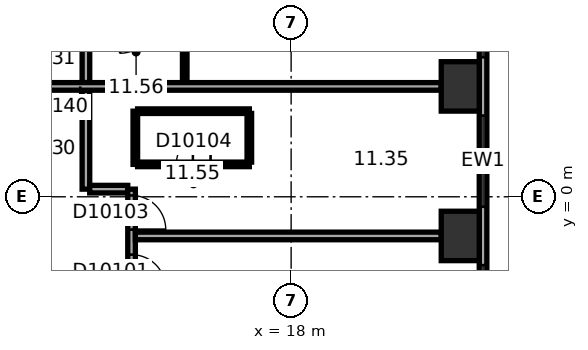
"""IFC4 building model, lengths in metres.
Left out: names, types, materials, properties, quantities, classifications, styles, units other than length and angle.
Written with IfcOpenShell. Run it as: python <this file> out.ifc"""

import sys

from ifc_helpers import new_model, si_unit, direction, frame, frame_2d, origin, origin_2d, place, context, subcontext, project, spatial, rectangle, extrude, element, fill, save


model = new_model("IFC4")
c1 = context("Model", 3, precision=1e-05, world=origin(), true_north=direction((0.0, 1.0)))
c2 = subcontext(c1, "Body", "Model", "MODEL_VIEW")
j1 = project(units=[si_unit("LENGTHUNIT", "METRE"), si_unit("PLANEANGLEUNIT", "RADIAN")], contexts=[c1])
p1 = place(None, origin())
s1 = spatial("IfcSite", under=j1, at=p1, CompositionType="ELEMENT")
p2 = place(p1, origin())
s2 = spatial("IfcBuilding", under=s1, at=p2, CompositionType="ELEMENT")
p3 = place(p2, frame((0.0, 0.0, 57.2)))
s3 = spatial("IfcBuildingStorey", under=s2, at=p3, CompositionType="ELEMENT", Elevation=57.2)
for number, where, z_axis, x_axis in (
    (1, (22.45, -1.03, 0.0), (0.0, 0.0, 1.0), (0.0, 1.0, 0.0)),
    (2, (22.45, 2.905, 0.0), (0.0, 0.0, 1.0), (0.0, 1.0, 0.0)),
):
    element("IfcColumn", number, at=place(p3, frame(where, z_axis=z_axis, x_axis=x_axis)), inside=s3, PredefinedType="COLUMN", context=c2, shape_type="SweptSolid", body=[
        extrude(rectangle(XDim=1.3, YDim=1.0, at=origin_2d()), origin(), (0.0, 0.0, 1.0), 3.3),
    ])
p4 = place(p3, frame((23.05, -9.687, 0.0), z_axis=(0.0, 0.0, 1.0), x_axis=(0.0, 1.0, 0.0)))
e3 = element("IfcWall", 3, at=p4, inside=s3, PredefinedType="STANDARD", context=c2, shape_type="SweptSolid", body=[
    extrude(rectangle(XDim=21.246, YDim=0.2, at=frame_2d((10.623, 0.0))), origin(), (0.0, 0.0, 1.0), 3.3),
])
p5 = place(p4, frame((1.555, 0.0, 0.8)))
e4 = element("IfcOpeningElement", 4, at=p5, cuts=e3, PredefinedType="OPENING", context=c2, shape_type="SweptSolid", body=[
    extrude(rectangle(XDim=2.4, YDim=1.7, at=frame_2d((1.2, 0.85))), frame((0.0, 0.11, 0.0), z_axis=(0.0, -1.0, 0.0), x_axis=(1.0, 0.0, 0.0)), (0.0, 0.0, 1.0), 0.22),
])
p6 = place(p4, frame((5.489, 0.0, 0.8)))
e5 = element("IfcOpeningElement", 5, at=p6, cuts=e3, PredefinedType="OPENING", context=c2, shape_type="SweptSolid", body=[
    extrude(rectangle(XDim=2.4, YDim=1.7, at=frame_2d((1.2, 0.85))), frame((0.0, 0.11, 0.0), z_axis=(0.0, -1.0, 0.0), x_axis=(1.0, 0.0, 0.0)), (0.0, 0.0, 1.0), 0.22),
])
p7 = place(p4, frame((9.424, 0.0, 0.8)))
e6 = element("IfcOpeningElement", 6, at=p7, cuts=e3, PredefinedType="OPENING", context=c2, shape_type="SweptSolid", body=[
    extrude(rectangle(XDim=2.4, YDim=1.7, at=frame_2d((1.2, 0.85))), frame((0.0, 0.11, 0.0), z_axis=(0.0, -1.0, 0.0), x_axis=(1.0, 0.0, 0.0)), (0.0, 0.0, 1.0), 0.22),
])
p8 = place(p4, frame((13.358, 0.0, 0.8)))
e7 = element("IfcOpeningElement", 7, at=p8, cuts=e3, PredefinedType="OPENING", context=c2, shape_type="SweptSolid", body=[
    extrude(rectangle(XDim=2.4, YDim=1.7, at=frame_2d((1.2, 0.85))), frame((0.0, 0.11, 0.0), z_axis=(0.0, -1.0, 0.0), x_axis=(1.0, 0.0, 0.0)), (0.0, 0.0, 1.0), 0.22),
])
p9 = place(p4, frame((17.293, 0.0, 0.8)))
e8 = element("IfcOpeningElement", 8, at=p9, cuts=e3, PredefinedType="OPENING", context=c2, shape_type="SweptSolid", body=[
    extrude(rectangle(XDim=2.4, YDim=1.7, at=frame_2d((1.2, 0.85))), frame((0.0, 0.11, 0.0), z_axis=(0.0, -1.0, 0.0), x_axis=(1.0, 0.0, 0.0)), (0.0, 0.0, 1.0), 0.22),
])
p10 = place(p3, frame((12.6, 0.201, 0.0), z_axis=(0.0, 0.0, 1.0), x_axis=(0.0, 1.0, 0.0)))
e9 = element("IfcWall", 9, at=p10, inside=s3, PredefinedType="PARTITIONING", context=c2, shape_type="SweptSolid", body=[
    extrude(rectangle(XDim=2.604, YDim=0.2, at=frame_2d((1.302, 0.0))), origin(), (0.0, 0.0, 1.0), 3.05),
])
p11 = place(p3, frame((12.6, 3.004, 0.0), z_axis=(0.0, 0.0, 1.0), x_axis=(0.0, 1.0, 0.0)))
e10 = element("IfcWall", 10, at=p11, inside=s3, PredefinedType="PARTITIONING", context=c2, shape_type="SweptSolid", body=[
    extrude(rectangle(XDim=3.173, YDim=0.2, at=frame_2d((1.586, 0.0))), origin(), (0.0, 0.0, 1.0), 3.05),
])
p12 = place(p11, frame((1.998, 0.0, 0.0)))
e11 = element("IfcOpeningElement", 11, at=p12, cuts=e10, PredefinedType="OPENING", context=c2, shape_type="SweptSolid", body=[
    extrude(rectangle(XDim=0.9, YDim=2.1, at=frame_2d((0.45, 1.05))), frame((0.0, 0.11, 0.0), z_axis=(0.0, -1.0, 0.0), x_axis=(1.0, 0.0, 0.0)), (0.0, 0.0, 1.0), 0.22),
])
p13 = place(p3, frame((13.701, 0.201, 0.0), z_axis=(0.0, 0.0, 1.0), x_axis=(-1.0, 0.0, 0.0)))
e12 = element("IfcWall", 12, at=p13, inside=s3, PredefinedType="PARTITIONING", context=c2, shape_type="SweptSolid", body=[
    extrude(rectangle(XDim=1.001, YDim=0.2, at=frame_2d((0.5, 0.0))), origin(), (0.0, 0.0, 1.0), 3.05),
])
p14 = place(p3, frame((13.801, -5.501, 0.0), z_axis=(0.0, 0.0, 1.0), x_axis=(0.0, 1.0, 0.0)))
e13 = element("IfcWall", 13, at=p14, inside=s3, PredefinedType="PARTITIONING", context=c2, shape_type="SweptSolid", body=[
    extrude(rectangle(XDim=5.702, YDim=0.2, at=frame_2d((2.851, 0.0))), origin(), (0.0, 0.0, 1.0), 3.05),
])
p15 = place(p14, frame((3.079, 0.0, 0.0)))
e14 = element("IfcOpeningElement", 14, at=p15, cuts=e13, PredefinedType="OPENING", context=c2, shape_type="SweptSolid", body=[
    extrude(rectangle(XDim=0.9, YDim=2.1, at=frame_2d((0.45, 1.05))), frame((0.0, 0.11, 0.0), z_axis=(0.0, -1.0, 0.0), x_axis=(1.0, 0.0, 0.0)), (0.0, 0.0, 1.0), 0.22),
])
p16 = place(p14, frame((4.636, 0.0, 0.0)))
e15 = element("IfcOpeningElement", 15, at=p16, cuts=e13, PredefinedType="OPENING", context=c2, shape_type="SweptSolid", body=[
    extrude(rectangle(XDim=0.9, YDim=2.1, at=frame_2d((0.45, 1.05))), frame((0.0, 0.11, 0.0), z_axis=(0.0, -1.0, 0.0), x_axis=(1.0, 0.0, 0.0)), (0.0, 0.0, 1.0), 0.22),
])
p17 = place(p3, frame((13.9, 0.853, 0.0), z_axis=(0.0, 0.0, 1.0), x_axis=(0.0, 1.0, 0.0)))
e16 = element("IfcWall", 16, at=p17, inside=s3, PredefinedType="PARTITIONING", context=c2, shape_type="SweptSolid", body=[
    extrude(rectangle(XDim=1.4, YDim=0.12, at=frame_2d((0.7, 0.0))), origin(), (0.0, 0.0, 1.0), 3.05),
])
p18 = place(p3, frame((13.96, 2.253, 0.0), z_axis=(0.0, 0.0, 1.0), x_axis=(1.0, 0.0, 0.0)))
e17 = element("IfcWall", 17, at=p18, inside=s3, PredefinedType="PARTITIONING", context=c2, shape_type="SweptSolid", body=[
    extrude(rectangle(XDim=2.94, YDim=0.12, at=frame_2d((1.47, 0.0))), origin(), (0.0, 0.0, 1.0), 3.05),
])
p19 = place(p3, frame((15.2, 4.618, 0.0), z_axis=(0.0, 0.0, 1.0), x_axis=(0.0, -1.0, 0.0)))
e18 = element("IfcWall", 18, at=p19, inside=s3, PredefinedType="PARTITIONING", context=c2, shape_type="SweptSolid", body=[
    extrude(rectangle(XDim=1.613, YDim=0.12, at=frame_2d((0.807, 0.0))), origin(), (0.0, 0.0, 1.0), 3.05),
])
p20 = place(p3, frame((16.9, 0.853, 0.0), z_axis=(0.0, 0.0, 1.0), x_axis=(-1.0, 0.0, 0.0)))
e19 = element("IfcWall", 19, at=p20, inside=s3, PredefinedType="PARTITIONING", context=c2, shape_type="SweptSolid", body=[
    extrude(rectangle(XDim=2.94, YDim=0.12, at=frame_2d((1.47, 0.0))), origin(), (0.0, 0.0, 1.0), 3.05),
])
p21 = place(p20, frame((1.02, 0.0, 0.0)))
e20 = element("IfcOpeningElement", 20, at=p21, cuts=e19, PredefinedType="OPENING", context=c2, shape_type="SweptSolid", body=[
    extrude(rectangle(XDim=0.9, YDim=2.1, at=frame_2d((0.45, 1.05))), frame((0.0, 0.07, 0.0), z_axis=(0.0, -1.0, 0.0), x_axis=(1.0, 0.0, 0.0)), (0.0, 0.0, 1.0), 0.14),
])
p22 = place(p3, frame((16.9, 2.193, 0.0), z_axis=(0.0, 0.0, 1.0), x_axis=(0.0, -1.0, 0.0)))
e21 = element("IfcWall", 21, at=p22, inside=s3, PredefinedType="PARTITIONING", context=c2, shape_type="SweptSolid", body=[
    extrude(rectangle(XDim=1.28, YDim=0.12, at=frame_2d((0.64, 0.0))), origin(), (0.0, 0.0, 1.0), 3.05),
])
p23 = place(p3, frame((21.95, -1.03, 0.0), z_axis=(0.0, 0.0, 1.0), x_axis=(-1.0, 0.0, 0.0)))
e22 = element("IfcWall", 22, at=p23, inside=s3, PredefinedType="PARTITIONING", context=c2, shape_type="SweptSolid", body=[
    extrude(rectangle(XDim=8.049, YDim=0.2, at=frame_2d((4.024, 0.0))), origin(), (0.0, 0.0, 1.0), 2.6),
])
p24 = place(p3, frame((21.95, 2.905, 0.0), z_axis=(0.0, 0.0, 1.0), x_axis=(-1.0, 0.0, 0.0)))
e23 = element("IfcWall", 23, at=p24, inside=s3, PredefinedType="PARTITIONING", context=c2, shape_type="SweptSolid", body=[
    extrude(rectangle(XDim=11.25, YDim=0.2, at=frame_2d((5.625, 0.0))), origin(), (0.0, 0.0, 1.0), 3.05),
])
p25 = place(p24, frame((9.5, 0.0, 0.0)))
e24 = element("IfcOpeningElement", 24, at=p25, cuts=e23, PredefinedType="OPENING", context=c2, shape_type="SweptSolid", body=[
    extrude(rectangle(XDim=1.6, YDim=2.1, at=frame_2d((0.8, 1.05))), frame((0.0, 0.11, 0.0), z_axis=(0.0, -1.0, 0.0), x_axis=(1.0, 0.0, 0.0)), (0.0, 0.0, 1.0), 0.22),
])
p26 = place(p6, origin())
e25 = element("IfcWindow", 25, at=p26, inside=s3, PartitioningType="SINGLE_PANEL", PredefinedType="WINDOW", context=c2, shape_type="SweptSolid", body=[
    extrude(rectangle(XDim=2.4, YDim=1.7, at=frame_2d((1.2, 0.85))), frame((0.0, 0.03, 0.0), z_axis=(0.0, -1.0, 0.0), x_axis=(1.0, 0.0, 0.0)), (0.0, 0.0, 1.0), 0.06),
])
fill(e5, e25)
p27 = place(p7, origin())
e26 = element("IfcWindow", 26, at=p27, inside=s3, PartitioningType="SINGLE_PANEL", PredefinedType="WINDOW", context=c2, shape_type="SweptSolid", body=[
    extrude(rectangle(XDim=2.4, YDim=1.7, at=frame_2d((1.2, 0.85))), frame((0.0, 0.03, 0.0), z_axis=(0.0, -1.0, 0.0), x_axis=(1.0, 0.0, 0.0)), (0.0, 0.0, 1.0), 0.06),
])
fill(e6, e26)
p28 = place(p8, origin())
e27 = element("IfcWindow", 27, at=p28, inside=s3, PartitioningType="SINGLE_PANEL", PredefinedType="WINDOW", context=c2, shape_type="SweptSolid", body=[
    extrude(rectangle(XDim=2.4, YDim=1.7, at=frame_2d((1.2, 0.85))), frame((0.0, 0.03, 0.0), z_axis=(0.0, -1.0, 0.0), x_axis=(1.0, 0.0, 0.0)), (0.0, 0.0, 1.0), 0.06),
])
fill(e7, e27)
p29 = place(p15, origin())
e28 = element("IfcDoor", 28, at=p29, inside=s3, OperationType="SINGLE_SWING_LEFT", PredefinedType="DOOR", context=c2, shape_type="SweptSolid", body=[
    extrude(rectangle(XDim=0.9, YDim=2.1, at=frame_2d((0.45, 1.05))), frame((0.0, 0.025, 0.0), z_axis=(0.0, -1.0, 0.0), x_axis=(1.0, 0.0, 0.0)), (0.0, 0.0, 1.0), 0.05),
])
fill(e14, e28)
p30 = place(p16, origin())
e29 = element("IfcDoor", 29, at=p30, inside=s3, OperationType="SINGLE_SWING_LEFT", PredefinedType="DOOR", context=c2, shape_type="SweptSolid", body=[
    extrude(rectangle(XDim=0.9, YDim=2.1, at=frame_2d((0.45, 1.05))), frame((0.0, 0.025, 0.0), z_axis=(0.0, -1.0, 0.0), x_axis=(1.0, 0.0, 0.0)), (0.0, 0.0, 1.0), 0.05),
])
fill(e15, e29)
p31 = place(p21, origin())
e30 = element("IfcDoor", 30, at=p31, inside=s3, OperationType="SINGLE_SWING_LEFT", PredefinedType="DOOR", context=c2, shape_type="SweptSolid", body=[
    extrude(rectangle(XDim=0.9, YDim=2.1, at=frame_2d((0.45, 1.05))), frame((0.0, 0.025, 0.0), z_axis=(0.0, -1.0, 0.0), x_axis=(1.0, 0.0, 0.0)), (0.0, 0.0, 1.0), 0.05),
])
fill(e20, e30)
p32 = place(p25, origin())
e31 = element("IfcDoor", 31, at=p32, inside=s3, OperationType="DOUBLE_DOOR_SINGLE_SWING", PredefinedType="DOOR", context=c2, shape_type="SweptSolid", body=[
    extrude(rectangle(XDim=1.6, YDim=2.1, at=frame_2d((0.8, 1.05))), frame((0.0, 0.025, 0.0), z_axis=(0.0, -1.0, 0.0), x_axis=(1.0, 0.0, 0.0)), (0.0, 0.0, 1.0), 0.05),
])
fill(e24, e31)
save(model, sys.argv[1])
